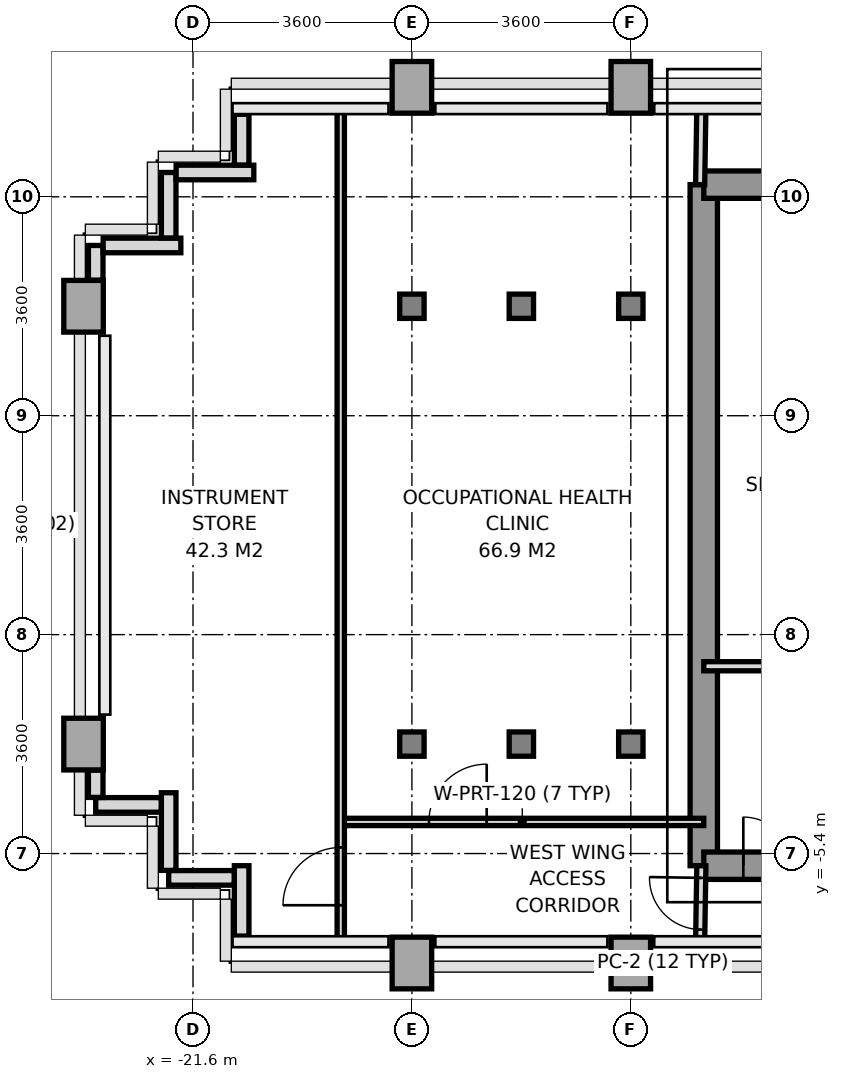
"""IFC4 building model, lengths in metres.
Left out: names, types, materials, properties, quantities, classifications, styles, units other than length and angle.
Written with IfcOpenShell. Run it as: python <this file> out.ifc"""

import sys

from ifc_helpers import new_model, si_unit, direction, frame, frame_2d, origin, origin_2d, place, context, subcontext, project, spatial, rectangle, i_section, extrude, source, transform, mapped, element, fill, save


model = new_model("IFC4")
c1 = context("Model", 3, precision=1e-05, world=origin(), true_north=direction((0.0, 1.0)))
c2 = subcontext(c1, "Body", "Model", "MODEL_VIEW")
j1 = project(units=[si_unit("LENGTHUNIT", "METRE"), si_unit("PLANEANGLEUNIT", "RADIAN")], contexts=[c1])
p1 = place(None, origin())
s1 = spatial("IfcSite", under=j1, at=p1, CompositionType="ELEMENT")
p2 = place(p1, origin())
s2 = spatial("IfcBuilding", under=s1, at=p2, CompositionType="ELEMENT")
p3 = place(p2, frame((0.0, 0.0, 144.8)))
s3 = spatial("IfcBuildingStorey", under=s2, at=p3, CompositionType="ELEMENT", Elevation=144.8)
m1 = source(origin(), c2, "Body", "SweptSolid", [
    extrude(rectangle(XDim=0.65, YDim=0.85, at=origin_2d()), origin(), (0.0, 0.0, 1.0), 3.2),
])
for number, where, z_axis, x_axis in (
    (1, (-23.4, -3.6, 0.0), (0.0, 0.0, 1.0), (1.0, 0.0, 0.0)),
    (2, (-23.4, 3.6, 0.0), (0.0, 0.0, 1.0), (1.0, 0.0, 0.0)),
    (3, (-18.0, -7.2, 0.0), (0.0, 0.0, 1.0), (1.0, 0.0, 0.0)),
):
    element("IfcColumn", number, at=place(p3, frame(where, z_axis=z_axis, x_axis=x_axis)), inside=s3, PredefinedType="COLUMN", context=c2, shape_type="MappedRepresentation", body=[
        mapped(m1, transform((0.0, 0.0, 0.0), x_axis=(1.0, 0.0, 0.0), y_axis=(0.0, 1.0, 0.0), z_axis=(0.0, 0.0, 1.0), scale=1.0)),
    ])
m2 = source(origin(), c2, "Body", "SweptSolid", [
    extrude(i_section(OverallWidth=0.401, OverallDepth=0.399, WebThickness=0.02, FlangeThickness=0.032, at=origin_2d()), origin(), (0.0, 0.0, 1.0), 3.2),
])
for number, where, z_axis, x_axis in (
    (4, (-18.0, -3.6, 0.0), (0.0, 0.0, 1.0), (1.0, 0.0, 0.0)),
    (5, (-18.0, 3.6, 0.0), (0.0, 0.0, 1.0), (1.0, 0.0, 0.0)),
):
    element("IfcColumn", number, at=place(p3, frame(where, z_axis=z_axis, x_axis=x_axis)), inside=s3, PredefinedType="COLUMN", context=c2, shape_type="MappedRepresentation", body=[
        mapped(m2, transform((0.0, 0.0, 0.0), x_axis=(1.0, 0.0, 0.0), y_axis=(0.0, 1.0, 0.0), z_axis=(0.0, 0.0, 1.0), scale=1.0)),
    ])
p4 = place(p3, frame((-18.0, 7.2, 0.0), z_axis=(0.0, 0.0, 1.0), x_axis=(1.0, 0.0, 0.0)))
e6 = element("IfcColumn", 6, at=p4, inside=s3, PredefinedType="COLUMN", context=c2, shape_type="MappedRepresentation", body=[
    mapped(m1, transform((0.0, 0.0, 0.0), x_axis=(1.0, 0.0, 0.0), y_axis=(0.0, 1.0, 0.0), z_axis=(0.0, 0.0, 1.0), scale=1.0)),
])
for number, where, z_axis, x_axis in (
    (7, (-16.2, -3.6, 0.0), (0.0, 0.0, 1.0), (1.0, 0.0, 0.0)),
    (8, (-16.2, 3.6, 0.0), (0.0, 0.0, 1.0), (1.0, 0.0, 0.0)),
):
    element("IfcColumn", number, at=place(p3, frame(where, z_axis=z_axis, x_axis=x_axis)), inside=s3, PredefinedType="COLUMN", context=c2, shape_type="MappedRepresentation", body=[
        mapped(m2, transform((0.0, 0.0, 0.0), x_axis=(1.0, 0.0, 0.0), y_axis=(0.0, 1.0, 0.0), z_axis=(0.0, 0.0, 1.0), scale=1.0)),
    ])
p5 = place(p3, frame((-14.4, -7.2, 0.0), z_axis=(0.0, 0.0, 1.0), x_axis=(1.0, 0.0, 0.0)))
e9 = element("IfcColumn", 9, at=p5, inside=s3, PredefinedType="COLUMN", context=c2, shape_type="MappedRepresentation", body=[
    mapped(m1, transform((0.0, 0.0, 0.0), x_axis=(1.0, 0.0, 0.0), y_axis=(0.0, 1.0, 0.0), z_axis=(0.0, 0.0, 1.0), scale=1.0)),
])
for number, where, z_axis, x_axis in (
    (10, (-14.4, -3.6, 0.0), (0.0, 0.0, 1.0), (1.0, 0.0, 0.0)),
    (11, (-14.4, 3.6, 0.0), (0.0, 0.0, 1.0), (1.0, 0.0, 0.0)),
):
    element("IfcColumn", number, at=place(p3, frame(where, z_axis=z_axis, x_axis=x_axis)), inside=s3, PredefinedType="COLUMN", context=c2, shape_type="MappedRepresentation", body=[
        mapped(m2, transform((0.0, 0.0, 0.0), x_axis=(1.0, 0.0, 0.0), y_axis=(0.0, 1.0, 0.0), z_axis=(0.0, 0.0, 1.0), scale=1.0)),
    ])
p6 = place(p3, frame((-14.4, 7.2, 0.0), z_axis=(0.0, 0.0, 1.0), x_axis=(1.0, 0.0, 0.0)))
e12 = element("IfcColumn", 12, at=p6, inside=s3, PredefinedType="COLUMN", context=c2, shape_type="MappedRepresentation", body=[
    mapped(m1, transform((0.0, 0.0, 0.0), x_axis=(1.0, 0.0, 0.0), y_axis=(0.0, 1.0, 0.0), z_axis=(0.0, 0.0, 1.0), scale=1.0)),
])
p7 = place(p3, frame((-20.8, -6.757, 0.0), z_axis=(0.0, 0.0, 1.0), x_axis=(0.0, 1.0, 0.0)))
e13 = element("IfcWall", 13, at=p7, inside=s3, PredefinedType="PARAPET", context=c2, shape_type="SweptSolid", body=[
    extrude(rectangle(XDim=1.157, YDim=0.24, at=frame_2d((0.579, 0.0))), origin(), (0.0, 0.0, 1.0), 1.15),
])
p8 = place(p3, frame((-20.923, -5.8, 0.0), z_axis=(0.0, 0.0, 1.0), x_axis=(-1.0, 0.0, 0.0)))
e14 = element("IfcWall", 14, at=p8, inside=s3, PredefinedType="PARAPET", context=c2, shape_type="SweptSolid", body=[
    extrude(rectangle(XDim=1.077, YDim=0.24, at=frame_2d((0.539, 0.0))), origin(), (0.0, 0.0, 1.0), 1.15),
])
p9 = place(p3, frame((-22.0, -5.677, 0.0), z_axis=(0.0, 0.0, 1.0), x_axis=(0.0, 1.0, 0.0)))
e15 = element("IfcWall", 15, at=p9, inside=s3, PredefinedType="PARAPET", context=c2, shape_type="SweptSolid", body=[
    extrude(rectangle(XDim=1.277, YDim=0.24, at=frame_2d((0.639, 0.0))), origin(), (0.0, 0.0, 1.0), 1.15),
])
p10 = place(p3, frame((-22.123, -4.6, 0.0), z_axis=(0.0, 0.0, 1.0), x_axis=(-1.0, 0.0, 0.0)))
e16 = element("IfcWall", 16, at=p10, inside=s3, PredefinedType="PARAPET", context=c2, shape_type="SweptSolid", body=[
    extrude(rectangle(XDim=1.077, YDim=0.24, at=frame_2d((0.539, 0.0))), origin(), (0.0, 0.0, 1.0), 1.15),
])
p11 = place(p3, frame((-23.2, -4.477, 0.0), z_axis=(0.0, 0.0, 1.0), x_axis=(0.0, 1.0, 0.0)))
e17 = element("IfcWall", 17, at=p11, inside=s3, PredefinedType="PARAPET", context=c2, shape_type="SweptSolid", body=[
    extrude(rectangle(XDim=0.449, YDim=0.24, at=frame_2d((0.225, 0.0))), origin(), (0.0, 0.0, 1.0), 1.15),
])
p12 = place(p3, frame((-23.2, 4.028, 0.0), z_axis=(0.0, 0.0, 1.0), x_axis=(0.0, 1.0, 0.0)))
e18 = element("IfcWall", 18, at=p12, inside=s3, PredefinedType="PARAPET", context=c2, shape_type="SweptSolid", body=[
    extrude(rectangle(XDim=0.572, YDim=0.24, at=frame_2d((0.286, 0.0))), origin(), (0.0, 0.0, 1.0), 1.15),
])
p13 = place(p3, frame((-23.077, 4.6, 0.0), z_axis=(0.0, 0.0, 1.0), x_axis=(1.0, 0.0, 0.0)))
e19 = element("IfcWall", 19, at=p13, inside=s3, PredefinedType="PARAPET", context=c2, shape_type="SweptSolid", body=[
    extrude(rectangle(XDim=1.277, YDim=0.24, at=frame_2d((0.638, 0.0))), origin(), (0.0, 0.0, 1.0), 1.15),
])
p14 = place(p3, frame((-22.0, 4.723, 0.0), z_axis=(0.0, 0.0, 1.0), x_axis=(0.0, 1.0, 0.0)))
e20 = element("IfcWall", 20, at=p14, inside=s3, PredefinedType="PARAPET", context=c2, shape_type="SweptSolid", body=[
    extrude(rectangle(XDim=1.077, YDim=0.24, at=frame_2d((0.539, 0.0))), origin(), (0.0, 0.0, 1.0), 1.15),
])
p15 = place(p3, frame((-21.877, 5.8, 0.0), z_axis=(0.0, 0.0, 1.0), x_axis=(1.0, 0.0, 0.0)))
e21 = element("IfcWall", 21, at=p15, inside=s3, PredefinedType="PARAPET", context=c2, shape_type="SweptSolid", body=[
    extrude(rectangle(XDim=1.277, YDim=0.24, at=frame_2d((0.638, 0.0))), origin(), (0.0, 0.0, 1.0), 1.15),
])
p16 = place(p3, frame((-20.8, 5.923, 0.0), z_axis=(0.0, 0.0, 1.0), x_axis=(0.0, 1.0, 0.0)))
e22 = element("IfcWall", 22, at=p16, inside=s3, PredefinedType="PARAPET", context=c2, shape_type="SweptSolid", body=[
    extrude(rectangle(XDim=0.834, YDim=0.24, at=frame_2d((0.417, 0.0))), origin(), (0.0, 0.0, 1.0), 1.15),
])
p17 = place(p3, frame((-13.2, -5.6, 0.0), z_axis=(0.0, 0.0, 1.0), x_axis=(0.0, 1.0, 0.0)))
e23 = element("IfcWall", 23, at=p17, inside=s3, PredefinedType="SHEAR", context=c2, shape_type="SweptSolid", body=[
    extrude(rectangle(XDim=11.2, YDim=0.45, at=frame_2d((5.6, 0.0))), origin(), (0.0, 0.0, 1.0), 3.2),
])
p18 = place(p3, frame((-13.2, 5.6, 0.0), z_axis=(0.0, 0.0, 1.0), x_axis=(1.0, 0.0, 0.0)))
e24 = element("IfcWall", 24, at=p18, inside=s3, PredefinedType="SHEAR", context=c2, shape_type="SweptSolid", body=[
    extrude(rectangle(XDim=1.819, YDim=0.45, at=frame_2d((0.909, 0.0))), origin(), (0.0, 0.0, 1.0), 3.2),
])
p19 = place(p3, frame((-13.2, -5.6, 0.0), z_axis=(0.0, 0.0, 1.0), x_axis=(1.0, 0.0, 0.0)))
e25 = element("IfcWall", 25, at=p19, inside=s3, PredefinedType="SHEAR", context=c2, shape_type="SweptSolid", body=[
    extrude(rectangle(XDim=7.8, YDim=0.45, at=frame_2d((3.9, 0.0))), origin(), (0.0, 0.0, 1.0), 3.2),
])
p20 = place(p19, frame((3.6, 0.0, 0.0)))
e26 = element("IfcOpeningElement", 26, at=p20, cuts=e25, PredefinedType="OPENING", context=c2, shape_type="SweptSolid", body=[
    extrude(rectangle(XDim=1.2, YDim=2.2, at=frame_2d((0.6, 1.1))), frame((0.0, 0.235, 0.0), z_axis=(0.0, -1.0, 0.0), x_axis=(1.0, 0.0, 0.0)), (0.0, 0.0, 1.0), 0.47),
])
p21 = place(p19, frame((0.65, 0.0, 0.0)))
e27 = element("IfcOpeningElement", 27, at=p21, cuts=e25, PredefinedType="OPENING", context=c2, shape_type="SweptSolid", body=[
    extrude(rectangle(XDim=0.8, YDim=2.1, at=frame_2d((0.4, 1.05))), frame((0.0, 0.235, 0.0), z_axis=(0.0, -1.0, 0.0), x_axis=(1.0, 0.0, 0.0)), (0.0, 0.0, 1.0), 0.47),
])
p22 = place(p3, frame((-13.2, -2.32, 0.0), z_axis=(0.0, 0.0, 1.0), x_axis=(1.0, 0.0, 0.0)))
e28 = element("IfcWall", 28, at=p22, inside=s3, PredefinedType="PARTITIONING", context=c2, shape_type="SweptSolid", body=[
    extrude(rectangle(XDim=2.18, YDim=0.15, at=frame_2d((1.09, 0.0))), origin(), (0.0, 0.0, 1.0), 3.2),
])
p23 = place(p3, frame((-13.26, 5.6, 0.0), z_axis=(0.0, 0.0, 1.0), x_axis=(0.016013571389, 0.999871774545, 0.0)))
e29 = element("IfcWall", 29, at=p23, inside=s3, PredefinedType="PARTITIONING", context=c2, shape_type="SweptSolid", body=[
    extrude(rectangle(XDim=1.25, YDim=0.15, at=frame_2d((0.625, 0.0))), origin(), (0.0, 0.0, 1.0), 3.2),
])
p24 = place(p3, frame((-13.26, -6.85, 0.0), z_axis=(0.0, 0.0, 1.0), x_axis=(0.016013571389, 0.999871774545, 0.0)))
e30 = element("IfcWall", 30, at=p24, inside=s3, PredefinedType="PARTITIONING", context=c2, shape_type="SweptSolid", body=[
    extrude(rectangle(XDim=1.25, YDim=0.15, at=frame_2d((0.625, 0.0))), origin(), (0.0, 0.0, 1.0), 3.2),
])
p25 = place(p24, frame((0.2, 0.0, 0.0)))
e31 = element("IfcOpeningElement", 31, at=p25, cuts=e30, PredefinedType="OPENING", context=c2, shape_type="SweptSolid", body=[
    extrude(rectangle(XDim=0.85, YDim=2.1, at=frame_2d((0.425, 1.05))), frame((0.0, 0.085, 0.0), z_axis=(0.0, -1.0, 0.0), x_axis=(1.0, 0.0, 0.0)), (0.0, 0.0, 1.0), 0.17),
])
p26 = place(p3, frame((-19.17, -4.88, 0.0), z_axis=(0.0, 0.0, 1.0), x_axis=(1.0, 0.0, 0.0)))
e32 = element("IfcWall", 32, at=p26, inside=s3, PredefinedType="PARTITIONING", context=c2, shape_type="SweptSolid", body=[
    extrude(rectangle(XDim=5.97, YDim=0.12, at=frame_2d((2.985, 0.0))), origin(), (0.0, 0.0, 1.0), 2.76),
])
p27 = place(p26, frame((1.45, 0.0, 0.0)))
e33 = element("IfcOpeningElement", 33, at=p27, cuts=e32, PredefinedType="OPENING", context=c2, shape_type="SweptSolid", body=[
    extrude(rectangle(XDim=0.95, YDim=2.15, at=frame_2d((0.475, 1.075))), frame((0.0, 0.07, 0.0), z_axis=(0.0, -1.0, 0.0), x_axis=(1.0, 0.0, 0.0)), (0.0, 0.0, 1.0), 0.14),
])
p28 = place(p3, frame((-19.17, -6.85, 0.0), z_axis=(0.0, 0.0, 1.0), x_axis=(0.0, 1.0, 0.0)))
e34 = element("IfcWall", 34, at=p28, inside=s3, PredefinedType="PARTITIONING", context=c2, shape_type="SweptSolid", body=[
    extrude(rectangle(XDim=13.7, YDim=0.12, at=frame_2d((6.85, 0.0))), origin(), (0.0, 0.0, 1.0), 2.7),
])
p29 = place(p28, frame((0.6, 0.0, 0.0)))
e35 = element("IfcOpeningElement", 35, at=p29, cuts=e34, PredefinedType="OPENING", context=c2, shape_type="SweptSolid", body=[
    extrude(rectangle(XDim=0.95, YDim=2.15, at=frame_2d((0.475, 1.075))), frame((0.0, 0.07, 0.0), z_axis=(0.0, -1.0, 0.0), x_axis=(1.0, 0.0, 0.0)), (0.0, 0.0, 1.0), 0.14),
])
m3 = source(origin(), c2, "Body", "SweptSolid", [
    extrude(rectangle(XDim=0.8, YDim=2.1, at=frame_2d((0.4, 1.05))), frame((0.0, 0.025, 0.0), z_axis=(0.0, -1.0, 0.0), x_axis=(1.0, 0.0, 0.0)), (0.0, 0.0, 1.0), 0.05),
])
p30 = place(p21, origin())
e36 = element("IfcDoor", 36, at=p30, inside=s3, OperationType="SINGLE_SWING_LEFT", PredefinedType="DOOR", context=c2, shape_type="MappedRepresentation", body=[
    mapped(m3, transform((0.0, 0.0, 0.0), x_axis=(1.0, 0.0, 0.0), y_axis=(0.0, 1.0, 0.0), z_axis=(0.0, 0.0, 1.0), scale=1.0)),
])
fill(e27, e36)
m4 = source(origin(), c2, "Body", "SweptSolid", [
    extrude(rectangle(XDim=0.95, YDim=2.15, at=frame_2d((0.475, 1.075))), frame((0.0, 0.025, 0.0), z_axis=(0.0, -1.0, 0.0), x_axis=(1.0, 0.0, 0.0)), (0.0, 0.0, 1.0), 0.05),
])
p31 = place(p27, origin())
e37 = element("IfcDoor", 37, at=p31, inside=s3, OperationType="SINGLE_SWING_RIGHT", PredefinedType="DOOR", context=c2, shape_type="MappedRepresentation", body=[
    mapped(m4, transform((0.0, 0.0, 0.0), x_axis=(1.0, 0.0, 0.0), y_axis=(0.0, 1.0, 0.0), z_axis=(0.0, 0.0, 1.0), scale=1.0)),
])
fill(e33, e37)
p32 = place(p29, origin())
e38 = element("IfcDoor", 38, at=p32, inside=s3, OperationType="SINGLE_SWING_LEFT", PredefinedType="DOOR", context=c2, shape_type="MappedRepresentation", body=[
    mapped(m4, transform((0.0, 0.0, 0.0), x_axis=(1.0, 0.0, 0.0), y_axis=(0.0, 1.0, 0.0), z_axis=(0.0, 0.0, 1.0), scale=1.0)),
])
fill(e35, e38)
m5 = source(origin(), c2, "Body", "SweptSolid", [
    extrude(rectangle(XDim=0.85, YDim=2.1, at=frame_2d((0.425, 1.05))), frame((0.0, 0.025, 0.0), z_axis=(0.0, -1.0, 0.0), x_axis=(1.0, 0.0, 0.0)), (0.0, 0.0, 1.0), 0.05),
])
p33 = place(p25, origin())
e39 = element("IfcDoor", 39, at=p33, inside=s3, OperationType="SINGLE_SWING_RIGHT", PredefinedType="DOOR", context=c2, shape_type="MappedRepresentation", body=[
    mapped(m5, transform((0.0, 0.0, 0.0), x_axis=(1.0, 0.0, 0.0), y_axis=(0.0, 1.0, 0.0), z_axis=(0.0, 0.0, 1.0), scale=1.0)),
])
fill(e31, e39)
save(model, sys.argv[1])
